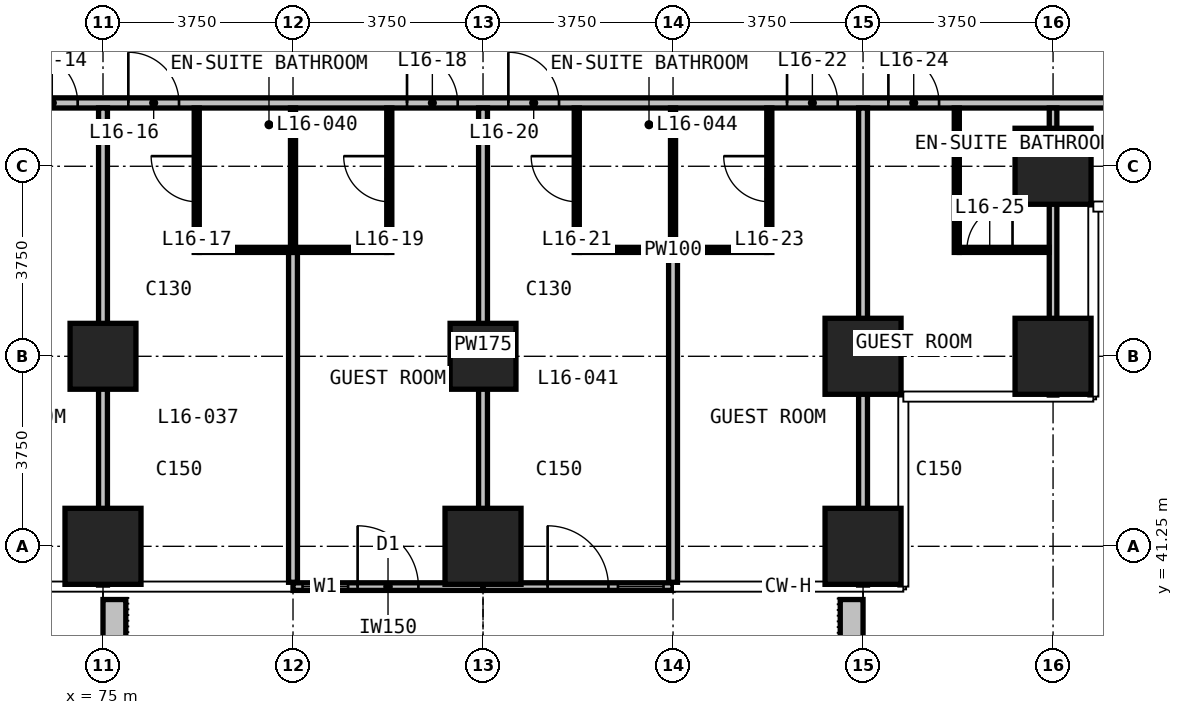
"""IFC4 building model, lengths in metres.
Left out: names, types, materials, properties, quantities, classifications, styles, units other than length and angle.
Written with IfcOpenShell. Run it as: python <this file> out.ifc"""

import sys

from ifc_helpers import new_model, si_unit, direction, frame, frame_2d, origin, origin_2d, place, context, subcontext, project, spatial, rectangle, extrude, element, fill, save


model = new_model("IFC4")
c1 = context("Model", 3, precision=1e-05, world=origin(), true_north=direction((0.0, 1.0)))
c2 = subcontext(c1, "Body", "Model", "MODEL_VIEW")
j1 = project(units=[si_unit("LENGTHUNIT", "METRE"), si_unit("PLANEANGLEUNIT", "RADIAN")], contexts=[c1])
p1 = place(None, origin())
s1 = spatial("IfcSite", under=j1, at=p1, CompositionType="ELEMENT")
p2 = place(p1, origin())
s2 = spatial("IfcBuilding", under=s1, at=p2, CompositionType="ELEMENT")
p3 = place(p2, frame((0.0, 0.0, 72.5)))
s3 = spatial("IfcBuildingStorey", under=s2, at=p3, CompositionType="ELEMENT", Elevation=72.5)
p4 = place(p3, frame((75.0, 41.25, 0.0), z_axis=(0.0, 0.0, 1.0), x_axis=(1.0, 0.0, 0.0)))
e1 = element("IfcColumn", 1, at=p4, inside=s3, PredefinedType="COLUMN", context=c2, shape_type="SweptSolid", body=[
    extrude(rectangle(XDim=1.5, YDim=1.5, at=origin_2d()), origin(), (0.0, 0.0, 1.0), 3.3),
])
p5 = place(p3, frame((75.0, 45.0, 0.0), z_axis=(0.0, 0.0, 1.0), x_axis=(1.0, 0.0, 0.0)))
e2 = element("IfcColumn", 2, at=p5, inside=s3, PredefinedType="COLUMN", context=c2, shape_type="SweptSolid", body=[
    extrude(rectangle(XDim=1.3, YDim=1.3, at=origin_2d()), origin(), (0.0, 0.0, 1.0), 3.3),
])
p6 = place(p3, frame((82.5, 41.25, 0.0), z_axis=(0.0, 0.0, 1.0), x_axis=(1.0, 0.0, 0.0)))
e3 = element("IfcColumn", 3, at=p6, inside=s3, PredefinedType="COLUMN", context=c2, shape_type="SweptSolid", body=[
    extrude(rectangle(XDim=1.5, YDim=1.5, at=origin_2d()), origin(), (0.0, 0.0, 1.0), 3.3),
])
p7 = place(p3, frame((82.5, 45.0, 0.0), z_axis=(0.0, 0.0, 1.0), x_axis=(1.0, 0.0, 0.0)))
e4 = element("IfcColumn", 4, at=p7, inside=s3, PredefinedType="COLUMN", context=c2, shape_type="SweptSolid", body=[
    extrude(rectangle(XDim=1.3, YDim=1.3, at=origin_2d()), origin(), (0.0, 0.0, 1.0), 3.3),
])
for number, where, z_axis, x_axis in (
    (5, (90.0, 41.25, 0.0), (0.0, 0.0, 1.0), (1.0, 0.0, 0.0)),
    (6, (90.0, 45.0, 0.0), (0.0, 0.0, 1.0), (1.0, 0.0, 0.0)),
    (7, (93.75, 45.0, 0.0), (0.0, 0.0, 1.0), (1.0, 0.0, 0.0)),
    (8, (93.75, 48.75, 0.0), (0.0, 0.0, 1.0), (1.0, 0.0, 0.0)),
):
    element("IfcColumn", number, at=place(p3, frame(where, z_axis=z_axis, x_axis=x_axis)), inside=s3, PredefinedType="COLUMN", context=c2, shape_type="SweptSolid", body=[
        extrude(rectangle(XDim=1.5, YDim=1.5, at=origin_2d()), origin(), (0.0, 0.0, 1.0), 3.3),
    ])
p8 = place(p3, frame((78.75, 40.455, 0.0), z_axis=(0.0, 0.0, 1.0), x_axis=(1.0, 0.0, 0.0)))
e9 = element("IfcWall", 9, at=p8, inside=s3, PredefinedType="SOLIDWALL", context=c2, shape_type="SweptSolid", body=[
    extrude(rectangle(XDim=3.75, YDim=0.15, at=frame_2d((1.875, 0.0))), origin(), (0.0, 0.0, 1.0), 3.0),
])
p9 = place(p8, frame((0.188, 0.0, 0.1)))
e10 = element("IfcOpeningElement", 10, at=p9, cuts=e9, PredefinedType="OPENING", context=c2, shape_type="SweptSolid", body=[
    extrude(rectangle(XDim=0.9, YDim=2.4, at=frame_2d((0.45, 1.2))), frame((0.0, 0.085, 0.0), z_axis=(0.0, -1.0, 0.0), x_axis=(1.0, 0.0, 0.0)), (0.0, 0.0, 1.0), 0.17),
])
p10 = place(p8, frame((1.275, 0.0, 0.0)))
e11 = element("IfcOpeningElement", 11, at=p10, cuts=e9, PredefinedType="OPENING", context=c2, shape_type="SweptSolid", body=[
    extrude(rectangle(XDim=1.2, YDim=2.4, at=frame_2d((0.6, 1.2))), frame((0.0, 0.085, 0.0), z_axis=(0.0, -1.0, 0.0), x_axis=(1.0, 0.0, 0.0)), (0.0, 0.0, 1.0), 0.17),
])
p11 = place(p3, frame((82.5, 40.455, 0.0), z_axis=(0.0, 0.0, 1.0), x_axis=(1.0, 0.0, 0.0)))
e12 = element("IfcWall", 12, at=p11, inside=s3, PredefinedType="SOLIDWALL", context=c2, shape_type="SweptSolid", body=[
    extrude(rectangle(XDim=3.75, YDim=0.15, at=frame_2d((1.875, 0.0))), origin(), (0.0, 0.0, 1.0), 3.0),
])
p12 = place(p11, frame((1.275, 0.0, 0.0)))
e13 = element("IfcOpeningElement", 13, at=p12, cuts=e12, PredefinedType="OPENING", context=c2, shape_type="SweptSolid", body=[
    extrude(rectangle(XDim=1.2, YDim=2.4, at=frame_2d((0.6, 1.2))), frame((0.0, 0.085, 0.0), z_axis=(0.0, -1.0, 0.0), x_axis=(1.0, 0.0, 0.0)), (0.0, 0.0, 1.0), 0.17),
])
p13 = place(p11, frame((2.663, 0.0, 0.1)))
e14 = element("IfcOpeningElement", 14, at=p13, cuts=e12, PredefinedType="OPENING", context=c2, shape_type="SweptSolid", body=[
    extrude(rectangle(XDim=0.9, YDim=2.4, at=frame_2d((0.45, 1.2))), frame((0.0, 0.085, 0.0), z_axis=(0.0, -1.0, 0.0), x_axis=(1.0, 0.0, 0.0)), (0.0, 0.0, 1.0), 0.17),
])
for number, where, z_axis, x_axis in (
    (15, (75.225, 40.2, 0.0), (0.0, 0.0, 1.0), (0.0, -1.0, 0.0)),
    (16, (89.775, 40.2, 0.0), (0.0, 0.0, 1.0), (0.0, -1.0, 0.0)),
):
    element("IfcWall", number, at=place(p3, frame(where, z_axis=z_axis, x_axis=x_axis)), inside=s3, PredefinedType="USERDEFINED", context=c2, shape_type="SweptSolid", body=[
        extrude(rectangle(XDim=2.35, YDim=0.45, at=frame_2d((1.175, 0.0))), origin(), (0.0, 0.0, 1.0), 1.1),
    ])
p14 = place(p3, frame((52.575, 50.0, 0.0), z_axis=(0.0, 0.0, 1.0), x_axis=(1.0, 0.0, 0.0)))
e17 = element("IfcWall", 17, at=p14, inside=s3, PredefinedType="PARTITIONING", context=c2, shape_type="SweptSolid", body=[
    extrude(rectangle(XDim=44.85, YDim=0.2, at=frame_2d((22.425, 0.0))), origin(), (0.0, 0.0, 1.0), 3.0),
])
p15 = place(p14, frame((5.925, 0.0, 0.0)))
e18 = element("IfcOpeningElement", 18, at=p15, cuts=e17, PredefinedType="OPENING", context=c2, shape_type="SweptSolid", body=[
    extrude(rectangle(XDim=1.0, YDim=2.2, at=frame_2d((0.5, 1.1))), frame((0.0, 0.11, 0.0), z_axis=(0.0, -1.0, 0.0), x_axis=(1.0, 0.0, 0.0)), (0.0, 0.0, 1.0), 0.22),
])
p16 = place(p14, frame((7.925, 0.0, 0.0)))
e19 = element("IfcOpeningElement", 19, at=p16, cuts=e17, PredefinedType="OPENING", context=c2, shape_type="SweptSolid", body=[
    extrude(rectangle(XDim=1.0, YDim=2.2, at=frame_2d((0.5, 1.1))), frame((0.0, 0.11, 0.0), z_axis=(0.0, -1.0, 0.0), x_axis=(1.0, 0.0, 0.0)), (0.0, 0.0, 1.0), 0.22),
])
p17 = place(p14, frame((13.425, 0.0, 0.0)))
e20 = element("IfcOpeningElement", 20, at=p17, cuts=e17, PredefinedType="OPENING", context=c2, shape_type="SweptSolid", body=[
    extrude(rectangle(XDim=1.0, YDim=2.2, at=frame_2d((0.5, 1.1))), frame((0.0, 0.11, 0.0), z_axis=(0.0, -1.0, 0.0), x_axis=(1.0, 0.0, 0.0)), (0.0, 0.0, 1.0), 0.22),
])
p18 = place(p14, frame((15.425, 0.0, 0.0)))
e21 = element("IfcOpeningElement", 21, at=p18, cuts=e17, PredefinedType="OPENING", context=c2, shape_type="SweptSolid", body=[
    extrude(rectangle(XDim=1.0, YDim=2.2, at=frame_2d((0.5, 1.1))), frame((0.0, 0.11, 0.0), z_axis=(0.0, -1.0, 0.0), x_axis=(1.0, 0.0, 0.0)), (0.0, 0.0, 1.0), 0.22),
])
p19 = place(p14, frame((20.925, 0.0, 0.0)))
e22 = element("IfcOpeningElement", 22, at=p19, cuts=e17, PredefinedType="OPENING", context=c2, shape_type="SweptSolid", body=[
    extrude(rectangle(XDim=1.0, YDim=2.2, at=frame_2d((0.5, 1.1))), frame((0.0, 0.11, 0.0), z_axis=(0.0, -1.0, 0.0), x_axis=(1.0, 0.0, 0.0)), (0.0, 0.0, 1.0), 0.22),
])
p20 = place(p14, frame((22.925, 0.0, 0.0)))
e23 = element("IfcOpeningElement", 23, at=p20, cuts=e17, PredefinedType="OPENING", context=c2, shape_type="SweptSolid", body=[
    extrude(rectangle(XDim=1.0, YDim=2.2, at=frame_2d((0.5, 1.1))), frame((0.0, 0.11, 0.0), z_axis=(0.0, -1.0, 0.0), x_axis=(1.0, 0.0, 0.0)), (0.0, 0.0, 1.0), 0.22),
])
p21 = place(p14, frame((28.425, 0.0, 0.0)))
e24 = element("IfcOpeningElement", 24, at=p21, cuts=e17, PredefinedType="OPENING", context=c2, shape_type="SweptSolid", body=[
    extrude(rectangle(XDim=1.0, YDim=2.2, at=frame_2d((0.5, 1.1))), frame((0.0, 0.11, 0.0), z_axis=(0.0, -1.0, 0.0), x_axis=(1.0, 0.0, 0.0)), (0.0, 0.0, 1.0), 0.22),
])
p22 = place(p14, frame((30.425, 0.0, 0.0)))
e25 = element("IfcOpeningElement", 25, at=p22, cuts=e17, PredefinedType="OPENING", context=c2, shape_type="SweptSolid", body=[
    extrude(rectangle(XDim=1.0, YDim=2.2, at=frame_2d((0.5, 1.1))), frame((0.0, 0.11, 0.0), z_axis=(0.0, -1.0, 0.0), x_axis=(1.0, 0.0, 0.0)), (0.0, 0.0, 1.0), 0.22),
])
p23 = place(p14, frame((35.925, 0.0, 0.0)))
e26 = element("IfcOpeningElement", 26, at=p23, cuts=e17, PredefinedType="OPENING", context=c2, shape_type="SweptSolid", body=[
    extrude(rectangle(XDim=1.0, YDim=2.2, at=frame_2d((0.5, 1.1))), frame((0.0, 0.11, 0.0), z_axis=(0.0, -1.0, 0.0), x_axis=(1.0, 0.0, 0.0)), (0.0, 0.0, 1.0), 0.22),
])
p24 = place(p14, frame((37.925, 0.0, 0.0)))
e27 = element("IfcOpeningElement", 27, at=p24, cuts=e17, PredefinedType="OPENING", context=c2, shape_type="SweptSolid", body=[
    extrude(rectangle(XDim=1.0, YDim=2.2, at=frame_2d((0.5, 1.1))), frame((0.0, 0.11, 0.0), z_axis=(0.0, -1.0, 0.0), x_axis=(1.0, 0.0, 0.0)), (0.0, 0.0, 1.0), 0.22),
])
p25 = place(p14, frame((1.4, 0.0, 0.0)))
e28 = element("IfcOpeningElement", 28, at=p25, cuts=e17, PredefinedType="OPENING", context=c2, shape_type="SweptSolid", body=[
    extrude(rectangle(XDim=0.9, YDim=2.2, at=frame_2d((0.45, 1.1))), frame((0.0, 0.11, 0.0), z_axis=(0.0, -1.0, 0.0), x_axis=(1.0, 0.0, 0.0)), (0.0, 0.0, 1.0), 0.22),
])
p26 = place(p14, frame((42.575, 0.0, 0.0)))
e29 = element("IfcOpeningElement", 29, at=p26, cuts=e17, PredefinedType="OPENING", context=c2, shape_type="SweptSolid", body=[
    extrude(rectangle(XDim=0.9, YDim=2.2, at=frame_2d((0.45, 1.1))), frame((0.0, 0.11, 0.0), z_axis=(0.0, -1.0, 0.0), x_axis=(1.0, 0.0, 0.0)), (0.0, 0.0, 1.0), 0.22),
])
p27 = place(p3, frame((75.0, 40.485, 0.0), z_axis=(0.0, 0.0, 1.0), x_axis=(0.0, 1.0, 0.0)))
e30 = element("IfcWall", 30, at=p27, inside=s3, PredefinedType="PARTITIONING", context=c2, shape_type="SweptSolid", body=[
    extrude(rectangle(XDim=9.415, YDim=0.175, at=frame_2d((4.708, 0.0))), origin(), (0.0, 0.0, 1.0), 3.0),
])
p28 = place(p3, frame((78.75, 40.54, 0.0), z_axis=(0.0, 0.0, 1.0), x_axis=(0.0, 1.0, 0.0)))
e31 = element("IfcWall", 31, at=p28, inside=s3, PredefinedType="PARTITIONING", context=c2, shape_type="SweptSolid", body=[
    extrude(rectangle(XDim=6.51, YDim=0.175, at=frame_2d((3.255, 0.0))), origin(), (0.0, 0.0, 1.0), 3.0),
])
p29 = place(p3, frame((82.5, 40.54, 0.0), z_axis=(0.0, 0.0, 1.0), x_axis=(0.0, 1.0, 0.0)))
e32 = element("IfcWall", 32, at=p29, inside=s3, PredefinedType="PARTITIONING", context=c2, shape_type="SweptSolid", body=[
    extrude(rectangle(XDim=9.36, YDim=0.175, at=frame_2d((4.68, 0.0))), origin(), (0.0, 0.0, 1.0), 3.0),
])
p30 = place(p3, frame((86.25, 40.54, 0.0), z_axis=(0.0, 0.0, 1.0), x_axis=(0.0, 1.0, 0.0)))
e33 = element("IfcWall", 33, at=p30, inside=s3, PredefinedType="PARTITIONING", context=c2, shape_type="SweptSolid", body=[
    extrude(rectangle(XDim=6.51, YDim=0.175, at=frame_2d((3.255, 0.0))), origin(), (0.0, 0.0, 1.0), 3.0),
])
p31 = place(p3, frame((90.0, 40.485, 0.0), z_axis=(0.0, 0.0, 1.0), x_axis=(0.0, 1.0, 0.0)))
e34 = element("IfcWall", 34, at=p31, inside=s3, PredefinedType="PARTITIONING", context=c2, shape_type="SweptSolid", body=[
    extrude(rectangle(XDim=9.415, YDim=0.175, at=frame_2d((4.708, 0.0))), origin(), (0.0, 0.0, 1.0), 3.0),
])
p32 = place(p3, frame((93.75, 44.235, 0.0), z_axis=(0.0, 0.0, 1.0), x_axis=(0.0, 1.0, 0.0)))
e35 = element("IfcWall", 35, at=p32, inside=s3, PredefinedType="PARTITIONING", context=c2, shape_type="SweptSolid", body=[
    extrude(rectangle(XDim=5.665, YDim=0.15, at=frame_2d((2.833, 0.0))), origin(), (0.0, 0.0, 1.0), 3.0),
])
for number, where, z_axis, x_axis in (
    (36, (76.9, 47.1, 0.0), (0.0, 0.0, 1.0), (1.0, 0.0, 0.0)),
    (37, (84.4, 47.1, 0.0), (0.0, 0.0, 1.0), (1.0, 0.0, 0.0)),
):
    element("IfcWall", number, at=place(p3, frame(where, z_axis=z_axis, x_axis=x_axis)), inside=s3, PredefinedType="PARTITIONING", context=c2, shape_type="SweptSolid", body=[
        extrude(rectangle(XDim=3.7, YDim=0.1, at=frame_2d((1.85, 0.0))), origin(), (0.0, 0.0, 1.0), 3.0),
    ])
p33 = place(p3, frame((91.9, 47.1, 0.0), z_axis=(0.0, 0.0, 1.0), x_axis=(1.0, 0.0, 0.0)))
e38 = element("IfcWall", 38, at=p33, inside=s3, PredefinedType="PARTITIONING", context=c2, shape_type="SweptSolid", body=[
    extrude(rectangle(XDim=1.775, YDim=0.1, at=frame_2d((0.888, 0.0))), origin(), (0.0, 0.0, 1.0), 3.0),
])
p34 = place(p33, frame((0.15, 0.0, 0.0)))
e39 = element("IfcOpeningElement", 39, at=p34, cuts=e38, PredefinedType="OPENING", context=c2, shape_type="SweptSolid", body=[
    extrude(rectangle(XDim=0.9, YDim=2.2, at=frame_2d((0.45, 1.1))), frame((0.0, 0.06, 0.0), z_axis=(0.0, -1.0, 0.0), x_axis=(1.0, 0.0, 0.0)), (0.0, 0.0, 1.0), 0.12),
])
p35 = place(p3, frame((76.85, 47.05, 0.0), z_axis=(0.0, 0.0, 1.0), x_axis=(0.0, 1.0, 0.0)))
e40 = element("IfcWall", 40, at=p35, inside=s3, PredefinedType="PARTITIONING", context=c2, shape_type="SweptSolid", body=[
    extrude(rectangle(XDim=2.85, YDim=0.1, at=frame_2d((1.425, 0.0))), origin(), (0.0, 0.0, 1.0), 3.0),
])
p36 = place(p35, frame((1.0, 0.0, 0.0)))
e41 = element("IfcOpeningElement", 41, at=p36, cuts=e40, PredefinedType="OPENING", context=c2, shape_type="SweptSolid", body=[
    extrude(rectangle(XDim=0.9, YDim=2.2, at=frame_2d((0.45, 1.1))), frame((0.0, 0.06, 0.0), z_axis=(0.0, -1.0, 0.0), x_axis=(1.0, 0.0, 0.0)), (0.0, 0.0, 1.0), 0.12),
])
p37 = place(p3, frame((78.75, 47.15, 0.0), z_axis=(0.0, 0.0, 1.0), x_axis=(0.0, 1.0, 0.0)))
e42 = element("IfcWall", 42, at=p37, inside=s3, PredefinedType="PARTITIONING", context=c2, shape_type="SweptSolid", body=[
    extrude(rectangle(XDim=2.75, YDim=0.1, at=frame_2d((1.375, 0.0))), origin(), (0.0, 0.0, 1.0), 3.0),
])
p38 = place(p3, frame((80.65, 47.05, 0.0), z_axis=(0.0, 0.0, 1.0), x_axis=(0.0, 1.0, 0.0)))
e43 = element("IfcWall", 43, at=p38, inside=s3, PredefinedType="PARTITIONING", context=c2, shape_type="SweptSolid", body=[
    extrude(rectangle(XDim=2.85, YDim=0.1, at=frame_2d((1.425, 0.0))), origin(), (0.0, 0.0, 1.0), 3.0),
])
p39 = place(p38, frame((1.0, 0.0, 0.0)))
e44 = element("IfcOpeningElement", 44, at=p39, cuts=e43, PredefinedType="OPENING", context=c2, shape_type="SweptSolid", body=[
    extrude(rectangle(XDim=0.9, YDim=2.2, at=frame_2d((0.45, 1.1))), frame((0.0, 0.06, 0.0), z_axis=(0.0, -1.0, 0.0), x_axis=(1.0, 0.0, 0.0)), (0.0, 0.0, 1.0), 0.12),
])
p40 = place(p3, frame((84.35, 47.05, 0.0), z_axis=(0.0, 0.0, 1.0), x_axis=(0.0, 1.0, 0.0)))
e45 = element("IfcWall", 45, at=p40, inside=s3, PredefinedType="PARTITIONING", context=c2, shape_type="SweptSolid", body=[
    extrude(rectangle(XDim=2.85, YDim=0.1, at=frame_2d((1.425, 0.0))), origin(), (0.0, 0.0, 1.0), 3.0),
])
p41 = place(p40, frame((1.0, 0.0, 0.0)))
e46 = element("IfcOpeningElement", 46, at=p41, cuts=e45, PredefinedType="OPENING", context=c2, shape_type="SweptSolid", body=[
    extrude(rectangle(XDim=0.9, YDim=2.2, at=frame_2d((0.45, 1.1))), frame((0.0, 0.06, 0.0), z_axis=(0.0, -1.0, 0.0), x_axis=(1.0, 0.0, 0.0)), (0.0, 0.0, 1.0), 0.12),
])
p42 = place(p3, frame((86.25, 47.15, 0.0), z_axis=(0.0, 0.0, 1.0), x_axis=(0.0, 1.0, 0.0)))
e47 = element("IfcWall", 47, at=p42, inside=s3, PredefinedType="PARTITIONING", context=c2, shape_type="SweptSolid", body=[
    extrude(rectangle(XDim=2.75, YDim=0.1, at=frame_2d((1.375, 0.0))), origin(), (0.0, 0.0, 1.0), 3.0),
])
p43 = place(p3, frame((88.15, 47.05, 0.0), z_axis=(0.0, 0.0, 1.0), x_axis=(0.0, 1.0, 0.0)))
e48 = element("IfcWall", 48, at=p43, inside=s3, PredefinedType="PARTITIONING", context=c2, shape_type="SweptSolid", body=[
    extrude(rectangle(XDim=2.85, YDim=0.1, at=frame_2d((1.425, 0.0))), origin(), (0.0, 0.0, 1.0), 3.0),
])
p44 = place(p43, frame((1.0, 0.0, 0.0)))
e49 = element("IfcOpeningElement", 49, at=p44, cuts=e48, PredefinedType="OPENING", context=c2, shape_type="SweptSolid", body=[
    extrude(rectangle(XDim=0.9, YDim=2.2, at=frame_2d((0.45, 1.1))), frame((0.0, 0.06, 0.0), z_axis=(0.0, -1.0, 0.0), x_axis=(1.0, 0.0, 0.0)), (0.0, 0.0, 1.0), 0.12),
])
p45 = place(p3, frame((91.85, 47.05, 0.0), z_axis=(0.0, 0.0, 1.0), x_axis=(0.0, 1.0, 0.0)))
e50 = element("IfcWall", 50, at=p45, inside=s3, PredefinedType="PARTITIONING", context=c2, shape_type="SweptSolid", body=[
    extrude(rectangle(XDim=2.85, YDim=0.1, at=frame_2d((1.425, 0.0))), origin(), (0.0, 0.0, 1.0), 3.0),
])
p46 = place(p9, origin())
e51 = element("IfcWindow", 51, at=p46, inside=s3, PartitioningType="SINGLE_PANEL", PredefinedType="WINDOW", context=c2, shape_type="SweptSolid", body=[
    extrude(rectangle(XDim=0.9, YDim=2.4, at=frame_2d((0.45, 1.2))), frame((0.0, 0.03, 0.0), z_axis=(0.0, -1.0, 0.0), x_axis=(1.0, 0.0, 0.0)), (0.0, 0.0, 1.0), 0.06),
])
fill(e10, e51)
p47 = place(p10, origin())
e52 = element("IfcDoor", 52, at=p47, inside=s3, OperationType="SINGLE_SWING_LEFT", PredefinedType="DOOR", context=c2, shape_type="SweptSolid", body=[
    extrude(rectangle(XDim=1.2, YDim=2.4, at=frame_2d((0.6, 1.2))), frame((0.0, 0.025, 0.0), z_axis=(0.0, -1.0, 0.0), x_axis=(1.0, 0.0, 0.0)), (0.0, 0.0, 1.0), 0.05),
])
fill(e11, e52)
p48 = place(p12, origin())
e53 = element("IfcDoor", 53, at=p48, inside=s3, OperationType="SINGLE_SWING_LEFT", PredefinedType="DOOR", context=c2, shape_type="SweptSolid", body=[
    extrude(rectangle(XDim=1.2, YDim=2.4, at=frame_2d((0.6, 1.2))), frame((0.0, 0.025, 0.0), z_axis=(0.0, -1.0, 0.0), x_axis=(1.0, 0.0, 0.0)), (0.0, 0.0, 1.0), 0.05),
])
fill(e13, e53)
p49 = place(p13, origin())
e54 = element("IfcWindow", 54, at=p49, inside=s3, PartitioningType="SINGLE_PANEL", PredefinedType="WINDOW", context=c2, shape_type="SweptSolid", body=[
    extrude(rectangle(XDim=0.9, YDim=2.4, at=frame_2d((0.45, 1.2))), frame((0.0, 0.03, 0.0), z_axis=(0.0, -1.0, 0.0), x_axis=(1.0, 0.0, 0.0)), (0.0, 0.0, 1.0), 0.06),
])
fill(e14, e54)
p50 = place(p19, origin())
e55 = element("IfcDoor", 55, at=p50, inside=s3, OperationType="SINGLE_SWING_LEFT", PredefinedType="DOOR", context=c2, shape_type="SweptSolid", body=[
    extrude(rectangle(XDim=1.0, YDim=2.2, at=frame_2d((0.5, 1.1))), frame((0.0, 0.025, 0.0), z_axis=(0.0, -1.0, 0.0), x_axis=(1.0, 0.0, 0.0)), (0.0, 0.0, 1.0), 0.05),
])
fill(e22, e55)
p51 = place(p20, origin())
e56 = element("IfcDoor", 56, at=p51, inside=s3, OperationType="SINGLE_SWING_LEFT", PredefinedType="DOOR", context=c2, shape_type="SweptSolid", body=[
    extrude(rectangle(XDim=1.0, YDim=2.2, at=frame_2d((0.5, 1.1))), frame((0.0, 0.025, 0.0), z_axis=(0.0, -1.0, 0.0), x_axis=(1.0, 0.0, 0.0)), (0.0, 0.0, 1.0), 0.05),
])
fill(e23, e56)
p52 = place(p36, origin())
e57 = element("IfcDoor", 57, at=p52, inside=s3, OperationType="SINGLE_SWING_RIGHT", PredefinedType="DOOR", context=c2, shape_type="SweptSolid", body=[
    extrude(rectangle(XDim=0.9, YDim=2.2, at=frame_2d((0.45, 1.1))), frame((0.0, 0.025, 0.0), z_axis=(0.0, -1.0, 0.0), x_axis=(1.0, 0.0, 0.0)), (0.0, 0.0, 1.0), 0.05),
])
fill(e41, e57)
p53 = place(p21, origin())
e58 = element("IfcDoor", 58, at=p53, inside=s3, OperationType="SINGLE_SWING_LEFT", PredefinedType="DOOR", context=c2, shape_type="SweptSolid", body=[
    extrude(rectangle(XDim=1.0, YDim=2.2, at=frame_2d((0.5, 1.1))), frame((0.0, 0.025, 0.0), z_axis=(0.0, -1.0, 0.0), x_axis=(1.0, 0.0, 0.0)), (0.0, 0.0, 1.0), 0.05),
])
fill(e24, e58)
p54 = place(p39, origin())
e59 = element("IfcDoor", 59, at=p54, inside=s3, OperationType="SINGLE_SWING_RIGHT", PredefinedType="DOOR", context=c2, shape_type="SweptSolid", body=[
    extrude(rectangle(XDim=0.9, YDim=2.2, at=frame_2d((0.45, 1.1))), frame((0.0, 0.025, 0.0), z_axis=(0.0, -1.0, 0.0), x_axis=(1.0, 0.0, 0.0)), (0.0, 0.0, 1.0), 0.05),
])
fill(e44, e59)
p55 = place(p22, origin())
e60 = element("IfcDoor", 60, at=p55, inside=s3, OperationType="SINGLE_SWING_RIGHT", PredefinedType="DOOR", context=c2, shape_type="SweptSolid", body=[
    extrude(rectangle(XDim=1.0, YDim=2.2, at=frame_2d((0.5, 1.1))), frame((0.0, 0.025, 0.0), z_axis=(0.0, -1.0, 0.0), x_axis=(1.0, 0.0, 0.0)), (0.0, 0.0, 1.0), 0.05),
])
fill(e25, e60)
p56 = place(p41, origin())
e61 = element("IfcDoor", 61, at=p56, inside=s3, OperationType="SINGLE_SWING_RIGHT", PredefinedType="DOOR", context=c2, shape_type="SweptSolid", body=[
    extrude(rectangle(XDim=0.9, YDim=2.2, at=frame_2d((0.45, 1.1))), frame((0.0, 0.025, 0.0), z_axis=(0.0, -1.0, 0.0), x_axis=(1.0, 0.0, 0.0)), (0.0, 0.0, 1.0), 0.05),
])
fill(e46, e61)
p57 = place(p23, origin())
e62 = element("IfcDoor", 62, at=p57, inside=s3, OperationType="SINGLE_SWING_LEFT", PredefinedType="DOOR", context=c2, shape_type="SweptSolid", body=[
    extrude(rectangle(XDim=1.0, YDim=2.2, at=frame_2d((0.5, 1.1))), frame((0.0, 0.025, 0.0), z_axis=(0.0, -1.0, 0.0), x_axis=(1.0, 0.0, 0.0)), (0.0, 0.0, 1.0), 0.05),
])
fill(e26, e62)
p58 = place(p44, origin())
e63 = element("IfcDoor", 63, at=p58, inside=s3, OperationType="SINGLE_SWING_RIGHT", PredefinedType="DOOR", context=c2, shape_type="SweptSolid", body=[
    extrude(rectangle(XDim=0.9, YDim=2.2, at=frame_2d((0.45, 1.1))), frame((0.0, 0.025, 0.0), z_axis=(0.0, -1.0, 0.0), x_axis=(1.0, 0.0, 0.0)), (0.0, 0.0, 1.0), 0.05),
])
fill(e49, e63)
p59 = place(p24, origin())
e64 = element("IfcDoor", 64, at=p59, inside=s3, OperationType="SINGLE_SWING_RIGHT", PredefinedType="DOOR", context=c2, shape_type="SweptSolid", body=[
    extrude(rectangle(XDim=1.0, YDim=2.2, at=frame_2d((0.5, 1.1))), frame((0.0, 0.025, 0.0), z_axis=(0.0, -1.0, 0.0), x_axis=(1.0, 0.0, 0.0)), (0.0, 0.0, 1.0), 0.05),
])
fill(e27, e64)
p60 = place(p34, origin())
e65 = element("IfcDoor", 65, at=p60, inside=s3, OperationType="SINGLE_SWING_RIGHT", PredefinedType="DOOR", context=c2, shape_type="SweptSolid", body=[
    extrude(rectangle(XDim=0.9, YDim=2.2, at=frame_2d((0.45, 1.1))), frame((0.0, 0.025, 0.0), z_axis=(0.0, -1.0, 0.0), x_axis=(1.0, 0.0, 0.0)), (0.0, 0.0, 1.0), 0.05),
])
fill(e39, e65)
save(model, sys.argv[1])
